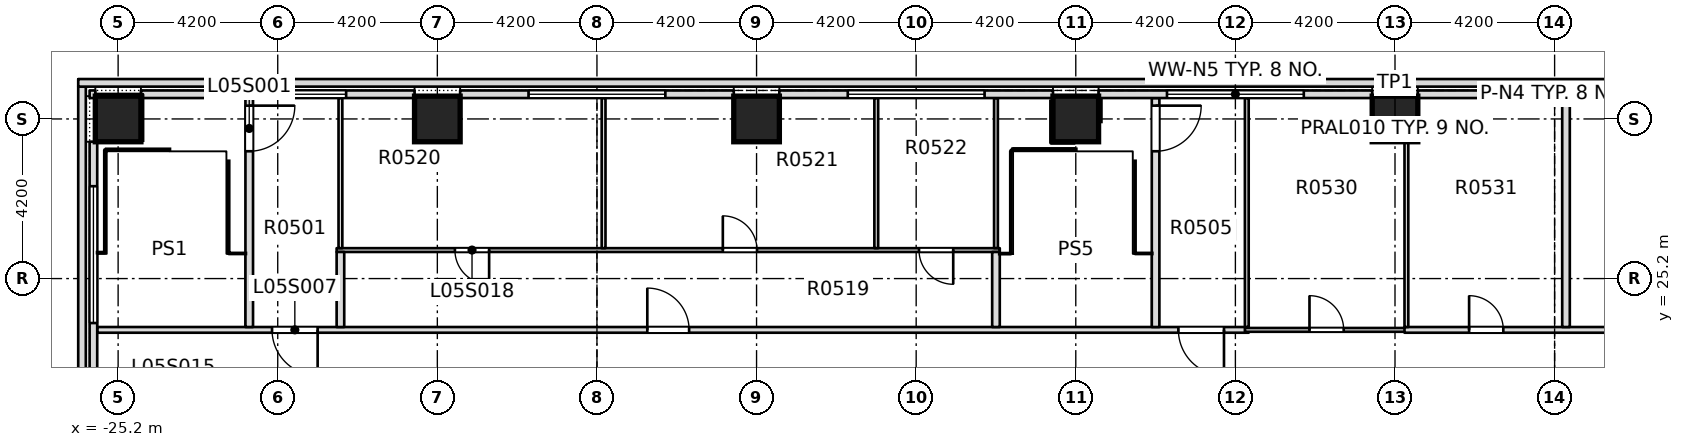
"""IFC4 building model, lengths in metres.
Left out: names, types, materials, properties, quantities, classifications, styles, units other than length and angle.
Written with IfcOpenShell. Run it as: python <this file> out.ifc"""

import sys

from ifc_helpers import new_model, si_unit, direction, frame, frame_2d, origin, origin_2d, place, context, subcontext, project, spatial, rectangle, extrude, element, fill, save


model = new_model("IFC4")
c1 = context("Model", 3, precision=1e-05, world=origin(), true_north=direction((0.0, 1.0)))
c2 = subcontext(c1, "Body", "Model", "MODEL_VIEW")
j1 = project(units=[si_unit("LENGTHUNIT", "METRE"), si_unit("PLANEANGLEUNIT", "RADIAN")], contexts=[c1])
p1 = place(None, origin())
s1 = spatial("IfcSite", under=j1, at=p1, CompositionType="ELEMENT")
p2 = place(p1, origin())
s2 = spatial("IfcBuilding", under=s1, at=p2, CompositionType="ELEMENT")
p3 = place(p2, frame((0.0, 0.0, 30.0)))
s3 = spatial("IfcBuildingStorey", under=s2, at=p3, CompositionType="ELEMENT", Elevation=30.0)
for number, where, z_axis, x_axis in (
    (1, (-25.2, 29.4, 0.0), (0.0, 0.0, 1.0), (1.0, 0.0, 0.0)),
    (2, (-16.8, 29.4, 0.0), (0.0, 0.0, 1.0), (1.0, 0.0, 0.0)),
    (3, (-8.4, 29.4, 0.0), (0.0, 0.0, 1.0), (1.0, 0.0, 0.0)),
    (4, (0.0, 29.4, 0.0), (0.0, 0.0, 1.0), (1.0, 0.0, 0.0)),
    (5, (8.4, 29.4, 0.0), (0.0, 0.0, 1.0), (1.0, 0.0, 0.0)),
):
    element("IfcColumn", number, at=place(p3, frame(where, z_axis=z_axis, x_axis=x_axis)), inside=s3, PredefinedType="COLUMN", context=c2, shape_type="SweptSolid", body=[
        extrude(rectangle(XDim=1.2, YDim=1.2, at=origin_2d()), origin(), (0.0, 0.0, 1.0), 4.18),
    ])
p4 = place(p3, frame((-26.15, 13.95, 4.5), z_axis=(0.0, 0.0, 1.0), x_axis=(0.0, 1.0, 0.0)))
e6 = element("IfcWall", 6, at=p4, inside=s3, PredefinedType="PARAPET", context=c2, shape_type="SweptSolid", body=[
    extrude(rectangle(XDim=16.3, YDim=0.2, at=frame_2d((8.15, 0.0))), origin(), (0.0, 0.0, 1.0), 1.2),
])
p5 = place(p3, frame((-26.25, 30.35, 4.5), z_axis=(0.0, 0.0, 1.0), x_axis=(1.0, 0.0, 0.0)))
e7 = element("IfcWall", 7, at=p5, inside=s3, PredefinedType="PARAPET", context=c2, shape_type="SweptSolid", body=[
    extrude(rectangle(XDim=69.3, YDim=0.2, at=frame_2d((34.65, 0.0))), origin(), (0.0, 0.0, 1.0), 1.2),
])
p6 = place(p3, frame((-25.75, 23.85, 0.0), z_axis=(0.0, 0.0, 1.0), x_axis=(1.0, 0.0, 0.0)))
e8 = element("IfcWall", 8, at=p6, inside=s3, PredefinedType="PARTITIONING", context=c2, shape_type="SweptSolid", body=[
    extrude(rectangle(XDim=30.3, YDim=0.15, at=frame_2d((15.15, 0.0))), origin(), (0.0, 0.0, 1.0), 4.18),
])
p7 = place(p6, frame((4.6, 0.0, 0.0)))
e9 = element("IfcOpeningElement", 9, at=p7, cuts=e8, PredefinedType="OPENING", context=c2, shape_type="SweptSolid", body=[
    extrude(rectangle(XDim=1.2, YDim=2.1, at=frame_2d((0.6, 1.05))), frame((0.0, 0.085, 0.0), z_axis=(0.0, -1.0, 0.0), x_axis=(1.0, 0.0, 0.0)), (0.0, 0.0, 1.0), 0.17),
])
p8 = place(p6, frame((28.45, 0.0, 0.0)))
e10 = element("IfcOpeningElement", 10, at=p8, cuts=e8, PredefinedType="OPENING", context=c2, shape_type="SweptSolid", body=[
    extrude(rectangle(XDim=1.2, YDim=2.1, at=frame_2d((0.6, 1.05))), frame((0.0, 0.085, 0.0), z_axis=(0.0, -1.0, 0.0), x_axis=(1.0, 0.0, 0.0)), (0.0, 0.0, 1.0), 0.17),
])
p9 = place(p6, frame((14.475, 0.0, 0.0)))
e11 = element("IfcOpeningElement", 11, at=p9, cuts=e8, PredefinedType="OPENING", context=c2, shape_type="SweptSolid", body=[
    extrude(rectangle(XDim=1.1, YDim=2.1, at=frame_2d((0.55, 1.05))), frame((0.0, 0.085, 0.0), z_axis=(0.0, -1.0, 0.0), x_axis=(1.0, 0.0, 0.0)), (0.0, 0.0, 1.0), 0.17),
])
p10 = place(p3, frame((4.45, 23.85, 0.0), z_axis=(0.0, 0.0, 1.0), x_axis=(1.0, 0.0, 0.0)))
e12 = element("IfcWall", 12, at=p10, inside=s3, PredefinedType="PARTITIONING", context=c2, shape_type="SweptSolid", body=[
    extrude(rectangle(XDim=4.3, YDim=0.1, at=frame_2d((2.15, 0.0))), origin(), (0.0, 0.0, 1.0), 4.18),
])
p11 = place(p10, frame((1.7, 0.0, 0.0)))
e13 = element("IfcOpeningElement", 13, at=p11, cuts=e12, PredefinedType="OPENING", context=c2, shape_type="SweptSolid", body=[
    extrude(rectangle(XDim=0.9, YDim=2.1, at=frame_2d((0.45, 1.05))), frame((0.0, 0.06, 0.0), z_axis=(0.0, -1.0, 0.0), x_axis=(1.0, 0.0, 0.0)), (0.0, 0.0, 1.0), 0.12),
])
p12 = place(p3, frame((8.65, 23.85, 0.0), z_axis=(0.0, 0.0, 1.0), x_axis=(1.0, 0.0, 0.0)))
e14 = element("IfcWall", 14, at=p12, inside=s3, PredefinedType="PARTITIONING", context=c2, shape_type="SweptSolid", body=[
    extrude(rectangle(XDim=27.6, YDim=0.15, at=frame_2d((13.8, 0.0))), origin(), (0.0, 0.0, 1.0), 4.18),
])
p13 = place(p12, frame((1.7, 0.0, 0.0)))
e15 = element("IfcOpeningElement", 15, at=p13, cuts=e14, PredefinedType="OPENING", context=c2, shape_type="SweptSolid", body=[
    extrude(rectangle(XDim=0.9, YDim=2.1, at=frame_2d((0.45, 1.05))), frame((0.0, 0.085, 0.0), z_axis=(0.0, -1.0, 0.0), x_axis=(1.0, 0.0, 0.0)), (0.0, 0.0, 1.0), 0.17),
])
p14 = place(p12, frame((15.425, 0.0, 0.0)))
e16 = element("IfcOpeningElement", 16, at=p14, cuts=e14, PredefinedType="OPENING", context=c2, shape_type="SweptSolid", body=[
    extrude(rectangle(XDim=0.9, YDim=2.1, at=frame_2d((0.45, 1.05))), frame((0.0, 0.085, 0.0), z_axis=(0.0, -1.0, 0.0), x_axis=(1.0, 0.0, 0.0)), (0.0, 0.0, 1.0), 0.17),
])
p15 = place(p3, frame((-19.45, 25.95, 0.0), z_axis=(0.0, 0.0, 1.0), x_axis=(1.0, 0.0, 0.0)))
e17 = element("IfcWall", 17, at=p15, inside=s3, PredefinedType="PARTITIONING", context=c2, shape_type="SweptSolid", body=[
    extrude(rectangle(XDim=17.45, YDim=0.1, at=frame_2d((8.725, 0.0))), origin(), (0.0, 0.0, 1.0), 4.18),
])
p16 = place(p15, frame((3.113, 0.0, 0.0)))
e18 = element("IfcOpeningElement", 18, at=p16, cuts=e17, PredefinedType="OPENING", context=c2, shape_type="SweptSolid", body=[
    extrude(rectangle(XDim=0.9, YDim=2.1, at=frame_2d((0.45, 1.05))), frame((0.0, 0.06, 0.0), z_axis=(0.0, -1.0, 0.0), x_axis=(1.0, 0.0, 0.0)), (0.0, 0.0, 1.0), 0.12),
])
p17 = place(p15, frame((10.162, 0.0, 0.0)))
e19 = element("IfcOpeningElement", 19, at=p17, cuts=e17, PredefinedType="OPENING", context=c2, shape_type="SweptSolid", body=[
    extrude(rectangle(XDim=0.9, YDim=2.1, at=frame_2d((0.45, 1.05))), frame((0.0, 0.06, 0.0), z_axis=(0.0, -1.0, 0.0), x_axis=(1.0, 0.0, 0.0)), (0.0, 0.0, 1.0), 0.12),
])
p18 = place(p15, frame((15.325, 0.0, 0.0)))
e20 = element("IfcOpeningElement", 20, at=p18, cuts=e17, PredefinedType="OPENING", context=c2, shape_type="SweptSolid", body=[
    extrude(rectangle(XDim=0.9, YDim=2.1, at=frame_2d((0.45, 1.05))), frame((0.0, 0.06, 0.0), z_axis=(0.0, -1.0, 0.0), x_axis=(1.0, 0.0, 0.0)), (0.0, 0.0, 1.0), 0.12),
])
p19 = place(p3, frame((-21.75, 23.925, 0.0), z_axis=(0.0, 0.0, 1.0), x_axis=(0.0, 1.0, 0.0)))
e21 = element("IfcWall", 21, at=p19, inside=s3, PredefinedType="PARTITIONING", context=c2, shape_type="SweptSolid", body=[
    extrude(rectangle(XDim=6.025, YDim=0.2, at=frame_2d((3.012, 0.0))), origin(), (0.0, 0.0, 1.0), 4.18),
])
p20 = place(p19, frame((4.625, 0.0, 0.0)))
e22 = element("IfcOpeningElement", 22, at=p20, cuts=e21, PredefinedType="OPENING", context=c2, shape_type="SweptSolid", body=[
    extrude(rectangle(XDim=1.2, YDim=2.1, at=frame_2d((0.6, 1.05))), frame((0.0, 0.11, 0.0), z_axis=(0.0, -1.0, 0.0), x_axis=(1.0, 0.0, 0.0)), (0.0, 0.0, 1.0), 0.22),
])
p21 = place(p3, frame((-19.35, 23.925, 0.0), z_axis=(0.0, 0.0, 1.0), x_axis=(0.0, 1.0, 0.0)))
e23 = element("IfcWall", 23, at=p21, inside=s3, PredefinedType="PARTITIONING", context=c2, shape_type="SweptSolid", body=[
    extrude(rectangle(XDim=1.975, YDim=0.2, at=frame_2d((0.987, 0.0))), origin(), (0.0, 0.0, 1.0), 4.18),
])
for number, where, z_axis, x_axis in (
    (24, (-19.35, 26.0, 0.0), (0.0, 0.0, 1.0), (0.0, 1.0, 0.0)),
    (25, (-12.425, 26.0, 0.0), (0.0, 0.0, 1.0), (0.0, 1.0, 0.0)),
    (26, (-5.25, 26.0, 0.0), (0.0, 0.0, 1.0), (0.0, 1.0, 0.0)),
):
    element("IfcWall", number, at=place(p3, frame(where, z_axis=z_axis, x_axis=x_axis)), inside=s3, PredefinedType="PARTITIONING", context=c2, shape_type="SweptSolid", body=[
        extrude(rectangle(XDim=3.95, YDim=0.1, at=frame_2d((1.975, 0.0))), origin(), (0.0, 0.0, 1.0), 4.18),
    ])
p22 = place(p3, frame((-2.1, 23.925, 0.0), z_axis=(0.0, 0.0, 1.0), x_axis=(0.0, 1.0, 0.0)))
e27 = element("IfcWall", 27, at=p22, inside=s3, PredefinedType="PARTITIONING", context=c2, shape_type="SweptSolid", body=[
    extrude(rectangle(XDim=1.975, YDim=0.2, at=frame_2d((0.987, 0.0))), origin(), (0.0, 0.0, 1.0), 4.18),
])
p23 = place(p3, frame((-2.1, 26.0, 0.0), z_axis=(0.0, 0.0, 1.0), x_axis=(0.0, 1.0, 0.0)))
e28 = element("IfcWall", 28, at=p23, inside=s3, PredefinedType="PARTITIONING", context=c2, shape_type="SweptSolid", body=[
    extrude(rectangle(XDim=3.95, YDim=0.1, at=frame_2d((1.975, 0.0))), origin(), (0.0, 0.0, 1.0), 4.18),
])
p24 = place(p3, frame((2.1, 23.925, 0.0), z_axis=(0.0, 0.0, 1.0), x_axis=(0.0, 1.0, 0.0)))
e29 = element("IfcWall", 29, at=p24, inside=s3, PredefinedType="PARTITIONING", context=c2, shape_type="SweptSolid", body=[
    extrude(rectangle(XDim=6.025, YDim=0.2, at=frame_2d((3.012, 0.0))), origin(), (0.0, 0.0, 1.0), 4.18),
])
p25 = place(p24, frame((4.625, 0.0, 0.0)))
e30 = element("IfcOpeningElement", 30, at=p25, cuts=e29, PredefinedType="OPENING", context=c2, shape_type="SweptSolid", body=[
    extrude(rectangle(XDim=1.2, YDim=2.1, at=frame_2d((0.6, 1.05))), frame((0.0, 0.11, 0.0), z_axis=(0.0, -1.0, 0.0), x_axis=(1.0, 0.0, 0.0)), (0.0, 0.0, 1.0), 0.22),
])
for number, where, z_axis, x_axis in (
    (31, (4.5, 23.925, 0.0), (0.0, 0.0, 1.0), (0.0, 1.0, 0.0)),
    (32, (8.7, 23.925, 0.0), (0.0, 0.0, 1.0), (0.0, 1.0, 0.0)),
):
    element("IfcWall", number, at=place(p3, frame(where, z_axis=z_axis, x_axis=x_axis)), inside=s3, PredefinedType="PARTITIONING", context=c2, shape_type="SweptSolid", body=[
        extrude(rectangle(XDim=6.025, YDim=0.1, at=frame_2d((3.012, 0.0))), origin(), (0.0, 0.0, 1.0), 4.18),
    ])
p26 = place(p3, frame((12.9, 23.925, 0.0), z_axis=(0.0, 0.0, 1.0), x_axis=(0.0, 1.0, 0.0)))
e33 = element("IfcWall", 33, at=p26, inside=s3, PredefinedType="PARTITIONING", context=c2, shape_type="SweptSolid", body=[
    extrude(rectangle(XDim=6.025, YDim=0.2, at=frame_2d((3.012, 0.0))), origin(), (0.0, 0.0, 1.0), 4.18),
])
p27 = place(p3, frame((16.2, 30.05, 0.0), z_axis=(0.0, 0.0, 1.0), x_axis=(-1.0, 0.0, 0.0)))
e34 = element("IfcWall", 34, at=p27, inside=s3, PredefinedType="STANDARD", context=c2, shape_type="SweptSolid", body=[
    extrude(rectangle(XDim=7.2, YDim=0.2, at=frame_2d((3.6, 0.0))), origin(), (0.0, 0.0, 1.0), 4.18),
])
p28 = place(p27, frame((1.8, 0.0, 0.9)))
e35 = element("IfcOpeningElement", 35, at=p28, cuts=e34, PredefinedType="OPENING", context=c2, shape_type="SweptSolid", body=[
    extrude(rectangle(XDim=3.6, YDim=2.4, at=frame_2d((1.8, 1.2))), frame((0.0, 0.11, 0.0), z_axis=(0.0, -1.0, 0.0), x_axis=(1.0, 0.0, 0.0)), (0.0, 0.0, 1.0), 0.22),
])
p29 = place(p3, frame((7.8, 30.05, 0.0), z_axis=(0.0, 0.0, 1.0), x_axis=(-1.0, 0.0, 0.0)))
e36 = element("IfcWall", 36, at=p29, inside=s3, PredefinedType="STANDARD", context=c2, shape_type="SweptSolid", body=[
    extrude(rectangle(XDim=7.2, YDim=0.2, at=frame_2d((3.6, 0.0))), origin(), (0.0, 0.0, 1.0), 4.18),
])
p30 = place(p29, frame((1.8, 0.0, 0.9)))
e37 = element("IfcOpeningElement", 37, at=p30, cuts=e36, PredefinedType="OPENING", context=c2, shape_type="SweptSolid", body=[
    extrude(rectangle(XDim=3.6, YDim=2.4, at=frame_2d((1.8, 1.2))), frame((0.0, 0.11, 0.0), z_axis=(0.0, -1.0, 0.0), x_axis=(1.0, 0.0, 0.0)), (0.0, 0.0, 1.0), 0.22),
])
p31 = place(p3, frame((-0.6, 30.05, 0.0), z_axis=(0.0, 0.0, 1.0), x_axis=(-1.0, 0.0, 0.0)))
e38 = element("IfcWall", 38, at=p31, inside=s3, PredefinedType="STANDARD", context=c2, shape_type="SweptSolid", body=[
    extrude(rectangle(XDim=7.2, YDim=0.2, at=frame_2d((3.6, 0.0))), origin(), (0.0, 0.0, 1.0), 4.18),
])
p32 = place(p31, frame((1.8, 0.0, 0.9)))
e39 = element("IfcOpeningElement", 39, at=p32, cuts=e38, PredefinedType="OPENING", context=c2, shape_type="SweptSolid", body=[
    extrude(rectangle(XDim=3.6, YDim=2.4, at=frame_2d((1.8, 1.2))), frame((0.0, 0.11, 0.0), z_axis=(0.0, -1.0, 0.0), x_axis=(1.0, 0.0, 0.0)), (0.0, 0.0, 1.0), 0.22),
])
p33 = place(p3, frame((-9.0, 30.05, 0.0), z_axis=(0.0, 0.0, 1.0), x_axis=(-1.0, 0.0, 0.0)))
e40 = element("IfcWall", 40, at=p33, inside=s3, PredefinedType="STANDARD", context=c2, shape_type="SweptSolid", body=[
    extrude(rectangle(XDim=7.2, YDim=0.2, at=frame_2d((3.6, 0.0))), origin(), (0.0, 0.0, 1.0), 4.18),
])
p34 = place(p33, frame((1.8, 0.0, 0.9)))
e41 = element("IfcOpeningElement", 41, at=p34, cuts=e40, PredefinedType="OPENING", context=c2, shape_type="SweptSolid", body=[
    extrude(rectangle(XDim=3.6, YDim=2.4, at=frame_2d((1.8, 1.2))), frame((0.0, 0.11, 0.0), z_axis=(0.0, -1.0, 0.0), x_axis=(1.0, 0.0, 0.0)), (0.0, 0.0, 1.0), 0.22),
])
p35 = place(p3, frame((-17.4, 30.05, 0.0), z_axis=(0.0, 0.0, 1.0), x_axis=(-1.0, 0.0, 0.0)))
e42 = element("IfcWall", 42, at=p35, inside=s3, PredefinedType="STANDARD", context=c2, shape_type="SweptSolid", body=[
    extrude(rectangle(XDim=7.2, YDim=0.2, at=frame_2d((3.6, 0.0))), origin(), (0.0, 0.0, 1.0), 4.18),
])
p36 = place(p35, frame((1.8, 0.0, 0.9)))
e43 = element("IfcOpeningElement", 43, at=p36, cuts=e42, PredefinedType="OPENING", context=c2, shape_type="SweptSolid", body=[
    extrude(rectangle(XDim=3.6, YDim=2.4, at=frame_2d((1.8, 1.2))), frame((0.0, 0.11, 0.0), z_axis=(0.0, -1.0, 0.0), x_axis=(1.0, 0.0, 0.0)), (0.0, 0.0, 1.0), 0.22),
])
p37 = place(p3, frame((-25.8, 30.05, 0.0), z_axis=(0.0, 0.0, 1.0), x_axis=(-1.0, 0.0, 0.0)))
e44 = element("IfcWall", 44, at=p37, inside=s3, PredefinedType="STANDARD", context=c2, shape_type="SweptSolid", body=[
    extrude(rectangle(XDim=0.15, YDim=0.2, at=frame_2d((0.075, 0.0))), origin(), (0.0, 0.0, 1.0), 4.18),
])
p38 = place(p3, frame((-25.85, 28.8, 0.0), z_axis=(0.0, 0.0, 1.0), x_axis=(0.0, -1.0, 0.0)))
e45 = element("IfcWall", 45, at=p38, inside=s3, PredefinedType="STANDARD", context=c2, shape_type="SweptSolid", body=[
    extrude(rectangle(XDim=7.2, YDim=0.2, at=frame_2d((3.6, 0.0))), origin(), (0.0, 0.0, 1.0), 4.18),
])
p39 = place(p38, frame((1.17, 0.0, 0.9)))
e46 = element("IfcOpeningElement", 46, at=p39, cuts=e45, PredefinedType="OPENING", context=c2, shape_type="SweptSolid", body=[
    extrude(rectangle(XDim=3.6, YDim=2.4, at=frame_2d((1.8, 1.2))), frame((0.0, 0.11, 0.0), z_axis=(0.0, -1.0, 0.0), x_axis=(1.0, 0.0, 0.0)), (0.0, 0.0, 1.0), 0.22),
])
p40 = place(p20, origin())
e47 = element("IfcDoor", 47, at=p40, inside=s3, OperationType="DOUBLE_DOOR_SINGLE_SWING", PredefinedType="DOOR", context=c2, shape_type="SweptSolid", body=[
    extrude(rectangle(XDim=1.2, YDim=2.1, at=frame_2d((0.6, 1.05))), frame((0.0, 0.025, 0.0), z_axis=(0.0, -1.0, 0.0), x_axis=(1.0, 0.0, 0.0)), (0.0, 0.0, 1.0), 0.05),
])
fill(e22, e47)
p41 = place(p25, origin())
e48 = element("IfcDoor", 48, at=p41, inside=s3, OperationType="DOUBLE_DOOR_SINGLE_SWING", PredefinedType="DOOR", context=c2, shape_type="SweptSolid", body=[
    extrude(rectangle(XDim=1.2, YDim=2.1, at=frame_2d((0.6, 1.05))), frame((0.0, 0.025, 0.0), z_axis=(0.0, -1.0, 0.0), x_axis=(1.0, 0.0, 0.0)), (0.0, 0.0, 1.0), 0.05),
])
fill(e30, e48)
p42 = place(p7, origin())
e49 = element("IfcDoor", 49, at=p42, inside=s3, OperationType="SINGLE_SWING_LEFT", PredefinedType="DOOR", context=c2, shape_type="SweptSolid", body=[
    extrude(rectangle(XDim=1.2, YDim=2.1, at=frame_2d((0.6, 1.05))), frame((0.0, 0.025, 0.0), z_axis=(0.0, -1.0, 0.0), x_axis=(1.0, 0.0, 0.0)), (0.0, 0.0, 1.0), 0.05),
])
fill(e9, e49)
p43 = place(p8, origin())
e50 = element("IfcDoor", 50, at=p43, inside=s3, OperationType="SINGLE_SWING_RIGHT", PredefinedType="DOOR", context=c2, shape_type="SweptSolid", body=[
    extrude(rectangle(XDim=1.2, YDim=2.1, at=frame_2d((0.6, 1.05))), frame((0.0, 0.025, 0.0), z_axis=(0.0, -1.0, 0.0), x_axis=(1.0, 0.0, 0.0)), (0.0, 0.0, 1.0), 0.05),
])
fill(e10, e50)
p44 = place(p9, origin())
e51 = element("IfcDoor", 51, at=p44, inside=s3, OperationType="SINGLE_SWING_LEFT", PredefinedType="DOOR", context=c2, shape_type="SweptSolid", body=[
    extrude(rectangle(XDim=1.1, YDim=2.1, at=frame_2d((0.55, 1.05))), frame((0.0, 0.025, 0.0), z_axis=(0.0, -1.0, 0.0), x_axis=(1.0, 0.0, 0.0)), (0.0, 0.0, 1.0), 0.05),
])
fill(e11, e51)
p45 = place(p16, origin())
e52 = element("IfcDoor", 52, at=p45, inside=s3, OperationType="SINGLE_SWING_LEFT", PredefinedType="DOOR", context=c2, shape_type="SweptSolid", body=[
    extrude(rectangle(XDim=0.9, YDim=2.1, at=frame_2d((0.45, 1.05))), frame((0.0, 0.025, 0.0), z_axis=(0.0, -1.0, 0.0), x_axis=(1.0, 0.0, 0.0)), (0.0, 0.0, 1.0), 0.05),
])
fill(e18, e52)
p46 = place(p17, origin())
e53 = element("IfcDoor", 53, at=p46, inside=s3, OperationType="SINGLE_SWING_LEFT", PredefinedType="DOOR", context=c2, shape_type="SweptSolid", body=[
    extrude(rectangle(XDim=0.9, YDim=2.1, at=frame_2d((0.45, 1.05))), frame((0.0, 0.025, 0.0), z_axis=(0.0, -1.0, 0.0), x_axis=(1.0, 0.0, 0.0)), (0.0, 0.0, 1.0), 0.05),
])
fill(e19, e53)
p47 = place(p18, origin())
e54 = element("IfcDoor", 54, at=p47, inside=s3, OperationType="SINGLE_SWING_LEFT", PredefinedType="DOOR", context=c2, shape_type="SweptSolid", body=[
    extrude(rectangle(XDim=0.9, YDim=2.1, at=frame_2d((0.45, 1.05))), frame((0.0, 0.025, 0.0), z_axis=(0.0, -1.0, 0.0), x_axis=(1.0, 0.0, 0.0)), (0.0, 0.0, 1.0), 0.05),
])
fill(e20, e54)
p48 = place(p11, origin())
e55 = element("IfcDoor", 55, at=p48, inside=s3, OperationType="SINGLE_SWING_RIGHT", PredefinedType="DOOR", context=c2, shape_type="SweptSolid", body=[
    extrude(rectangle(XDim=0.9, YDim=2.1, at=frame_2d((0.45, 1.05))), frame((0.0, 0.025, 0.0), z_axis=(0.0, -1.0, 0.0), x_axis=(1.0, 0.0, 0.0)), (0.0, 0.0, 1.0), 0.05),
])
fill(e13, e55)
p49 = place(p13, origin())
e56 = element("IfcDoor", 56, at=p49, inside=s3, OperationType="SINGLE_SWING_RIGHT", PredefinedType="DOOR", context=c2, shape_type="SweptSolid", body=[
    extrude(rectangle(XDim=0.9, YDim=2.1, at=frame_2d((0.45, 1.05))), frame((0.0, 0.025, 0.0), z_axis=(0.0, -1.0, 0.0), x_axis=(1.0, 0.0, 0.0)), (0.0, 0.0, 1.0), 0.05),
])
fill(e15, e56)
p50 = place(p28, origin())
e57 = element("IfcWindow", 57, at=p50, inside=s3, PartitioningType="SINGLE_PANEL", PredefinedType="WINDOW", context=c2, shape_type="SweptSolid", body=[
    extrude(rectangle(XDim=3.6, YDim=2.4, at=frame_2d((1.8, 1.2))), frame((0.0, 0.03, 0.0), z_axis=(0.0, -1.0, 0.0), x_axis=(1.0, 0.0, 0.0)), (0.0, 0.0, 1.0), 0.06),
])
fill(e35, e57)
p51 = place(p30, origin())
e58 = element("IfcWindow", 58, at=p51, inside=s3, PartitioningType="SINGLE_PANEL", PredefinedType="WINDOW", context=c2, shape_type="SweptSolid", body=[
    extrude(rectangle(XDim=3.6, YDim=2.4, at=frame_2d((1.8, 1.2))), frame((0.0, 0.03, 0.0), z_axis=(0.0, -1.0, 0.0), x_axis=(1.0, 0.0, 0.0)), (0.0, 0.0, 1.0), 0.06),
])
fill(e37, e58)
p52 = place(p32, origin())
e59 = element("IfcWindow", 59, at=p52, inside=s3, PartitioningType="SINGLE_PANEL", PredefinedType="WINDOW", context=c2, shape_type="SweptSolid", body=[
    extrude(rectangle(XDim=3.6, YDim=2.4, at=frame_2d((1.8, 1.2))), frame((0.0, 0.03, 0.0), z_axis=(0.0, -1.0, 0.0), x_axis=(1.0, 0.0, 0.0)), (0.0, 0.0, 1.0), 0.06),
])
fill(e39, e59)
p53 = place(p34, origin())
e60 = element("IfcWindow", 60, at=p53, inside=s3, PartitioningType="SINGLE_PANEL", PredefinedType="WINDOW", context=c2, shape_type="SweptSolid", body=[
    extrude(rectangle(XDim=3.6, YDim=2.4, at=frame_2d((1.8, 1.2))), frame((0.0, 0.03, 0.0), z_axis=(0.0, -1.0, 0.0), x_axis=(1.0, 0.0, 0.0)), (0.0, 0.0, 1.0), 0.06),
])
fill(e41, e60)
p54 = place(p36, origin())
e61 = element("IfcWindow", 61, at=p54, inside=s3, PartitioningType="SINGLE_PANEL", PredefinedType="WINDOW", context=c2, shape_type="SweptSolid", body=[
    extrude(rectangle(XDim=3.6, YDim=2.4, at=frame_2d((1.8, 1.2))), frame((0.0, 0.03, 0.0), z_axis=(0.0, -1.0, 0.0), x_axis=(1.0, 0.0, 0.0)), (0.0, 0.0, 1.0), 0.06),
])
fill(e43, e61)
p55 = place(p39, origin())
e62 = element("IfcWindow", 62, at=p55, inside=s3, PartitioningType="SINGLE_PANEL", PredefinedType="WINDOW", context=c2, shape_type="SweptSolid", body=[
    extrude(rectangle(XDim=3.6, YDim=2.4, at=frame_2d((1.8, 1.2))), frame((0.0, 0.03, 0.0), z_axis=(0.0, -1.0, 0.0), x_axis=(1.0, 0.0, 0.0)), (0.0, 0.0, 1.0), 0.06),
])
fill(e46, e62)
save(model, sys.argv[1])
